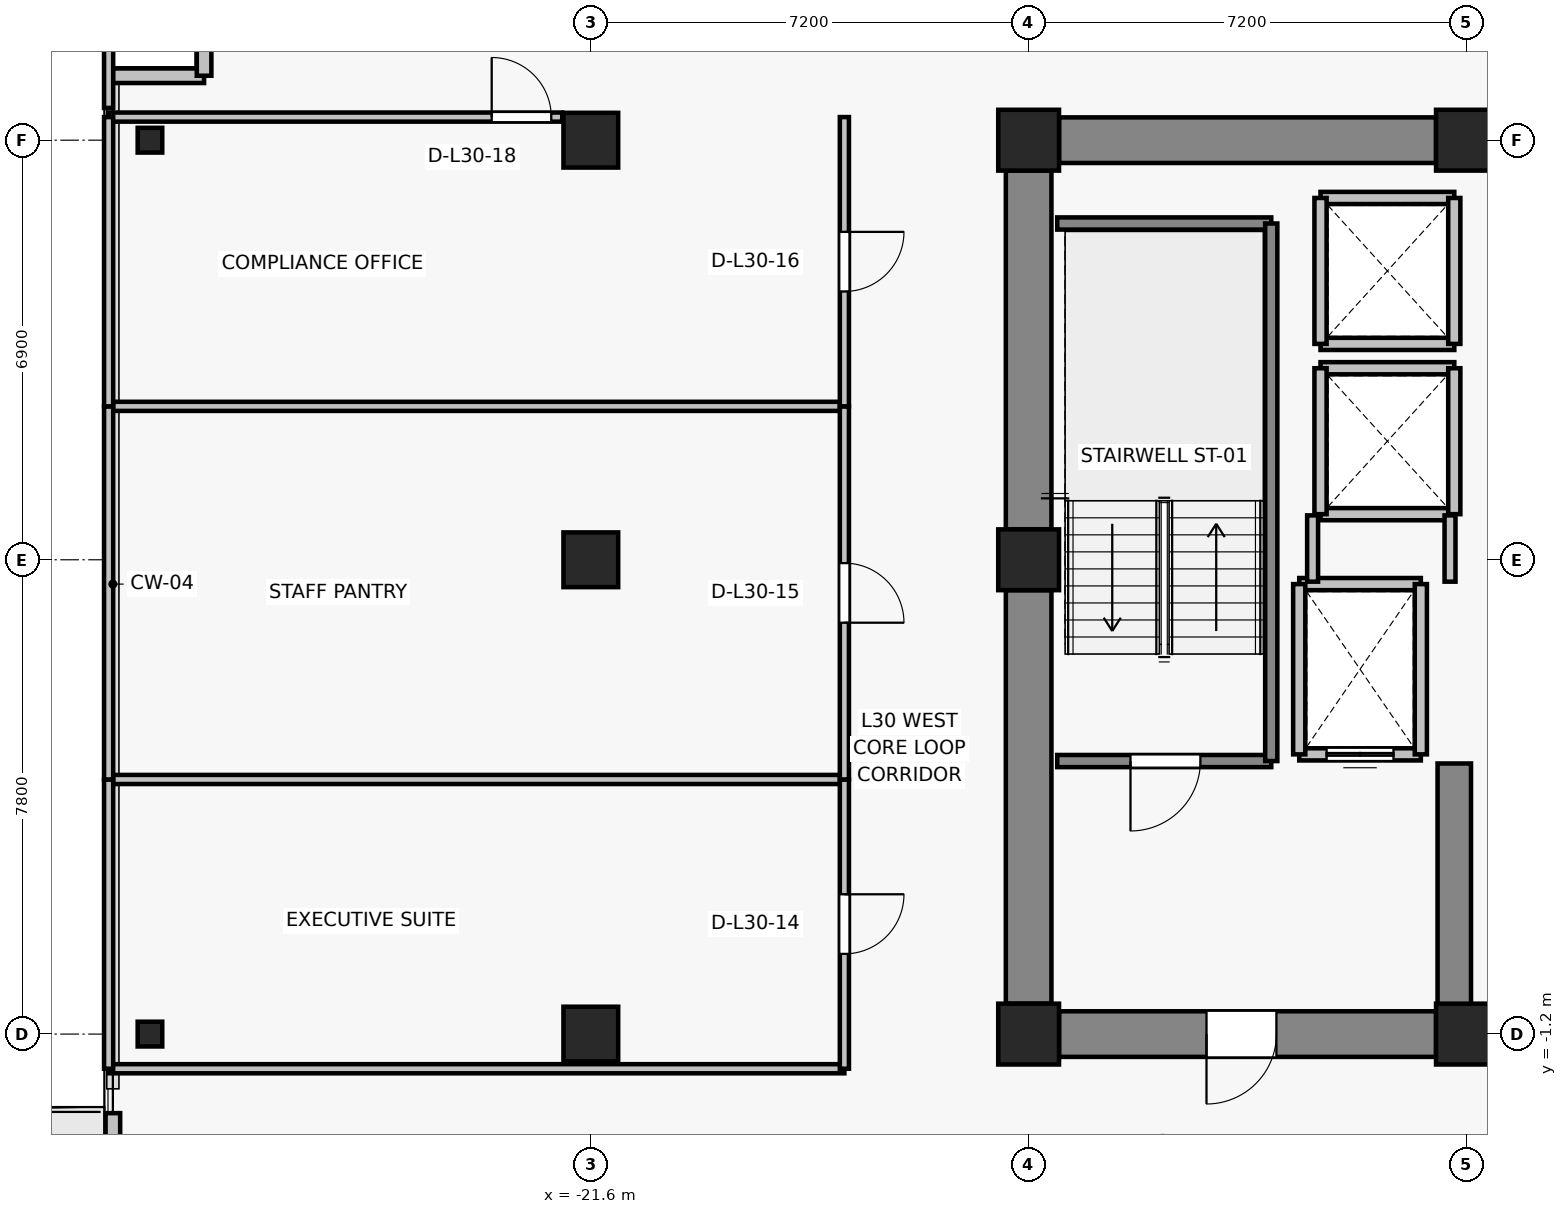
"""IFC4 building model, lengths in metres.
Left out: names, types, materials, properties, quantities, classifications, styles, units other than length and angle.
Written with IfcOpenShell. Run it as: python <this file> out.ifc"""

import sys

from ifc_helpers import new_model, si_unit, direction, frame, frame_2d, origin, origin_2d, place, context, subcontext, project, spatial, rectangle, i_section, extrude, source, transform, mapped, element, fill, save


model = new_model("IFC4")
c1 = context("Model", 3, precision=1e-05, world=origin(), true_north=direction((0.0, 1.0)))
c2 = subcontext(c1, "Body", "Model", "MODEL_VIEW")
j1 = project(units=[si_unit("LENGTHUNIT", "METRE"), si_unit("PLANEANGLEUNIT", "RADIAN")], contexts=[c1])
p1 = place(None, origin())
s1 = spatial("IfcSite", under=j1, at=p1, CompositionType="ELEMENT")
p2 = place(p1, origin())
s2 = spatial("IfcBuilding", under=s1, at=p2, CompositionType="ELEMENT")
p3 = place(p2, frame((0.0, 0.0, 109.9)))
s3 = spatial("IfcBuildingStorey", under=s2, at=p3, CompositionType="ELEMENT", Elevation=109.9)
for number, where, z_axis, x_axis in (
    (1, (-14.4, -1.2, 0.0), (0.0, 0.0, 1.0), (1.0, 0.0, 0.0)),
    (2, (-7.2, -1.2, 0.0), (0.0, 0.0, 1.0), (1.0, 0.0, 0.0)),
    (3, (-14.4, 6.6, 0.0), (0.0, 0.0, 1.0), (1.0, 0.0, 0.0)),
    (4, (-14.4, 13.5, 0.0), (0.0, 0.0, 1.0), (1.0, 0.0, 0.0)),
    (5, (-7.2, 13.5, 0.0), (0.0, 0.0, 1.0), (1.0, 0.0, 0.0)),
):
    element("IfcColumn", number, at=place(p3, frame(where, z_axis=z_axis, x_axis=x_axis)), inside=s3, PredefinedType="COLUMN", context=c2, shape_type="SweptSolid", body=[
        extrude(rectangle(XDim=1.0, YDim=1.0, at=origin_2d()), origin(), (0.0, 0.0, 1.0), 3.3),
    ])
for number, where, z_axis, x_axis in (
    (6, (-21.6, -1.2, 0.0), (0.0, 0.0, 1.0), (1.0, 0.0, 0.0)),
    (7, (-21.6, 6.6, 0.0), (0.0, 0.0, 1.0), (1.0, 0.0, 0.0)),
    (8, (-21.6, 13.5, 0.0), (0.0, 0.0, 1.0), (1.0, 0.0, 0.0)),
):
    element("IfcColumn", number, at=place(p3, frame(where, z_axis=z_axis, x_axis=x_axis)), inside=s3, PredefinedType="COLUMN", context=c2, shape_type="SweptSolid", body=[
        extrude(rectangle(XDim=0.9, YDim=0.9, at=origin_2d()), origin(), (0.0, 0.0, 1.0), 3.3),
    ])
for number, where, z_axis, x_axis in (
    (9, (-28.85, -1.2, 0.0), (0.0, 0.0, 1.0), (1.0, 0.0, 0.0)),
    (10, (-28.85, 13.5, 0.0), (0.0, 0.0, 1.0), (1.0, 0.0, 0.0)),
):
    element("IfcColumn", number, at=place(p3, frame(where, z_axis=z_axis, x_axis=x_axis)), inside=s3, PredefinedType="COLUMN", context=c2, shape_type="SweptSolid", body=[
        extrude(i_section(OverallWidth=0.404, OverallDepth=0.407, WebThickness=0.022, FlangeThickness=0.032, FilletRadius=0.015, at=origin_2d()), origin(), (0.0, 0.0, 1.0), 3.3),
    ])
p4 = place(p3, frame((-13.9, 13.5, 0.0), z_axis=(0.0, 0.0, 1.0), x_axis=(1.0, 0.0, 0.0)))
e11 = element("IfcWall", 11, at=p4, inside=s3, PredefinedType="SHEAR", context=c2, shape_type="SweptSolid", body=[
    extrude(rectangle(XDim=6.2, YDim=0.75, at=frame_2d((3.1, 0.0))), origin(), (0.0, 0.0, 1.0), 3.075),
])
p5 = place(p3, frame((-14.4, -0.7, 0.0), z_axis=(0.0, 0.0, 1.0), x_axis=(0.0, 1.0, 0.0)))
e12 = element("IfcWall", 12, at=p5, inside=s3, PredefinedType="SHEAR", context=c2, shape_type="SweptSolid", body=[
    extrude(rectangle(XDim=6.8, YDim=0.75, at=frame_2d((3.4, 0.0))), origin(), (0.0, 0.0, 1.0), 3.075),
])
p6 = place(p3, frame((-14.4, 7.1, 0.0), z_axis=(0.0, 0.0, 1.0), x_axis=(0.0, 1.0, 0.0)))
e13 = element("IfcWall", 13, at=p6, inside=s3, PredefinedType="SHEAR", context=c2, shape_type="SweptSolid", body=[
    extrude(rectangle(XDim=5.9, YDim=0.75, at=frame_2d((2.95, 0.0))), origin(), (0.0, 0.0, 1.0), 3.075),
])
p7 = place(p3, frame((-7.7, -1.2, 0.0), z_axis=(0.0, 0.0, 1.0), x_axis=(-1.0, 0.0, 0.0)))
e14 = element("IfcWall", 14, at=p7, inside=s3, PredefinedType="SHEAR", context=c2, shape_type="SweptSolid", body=[
    extrude(rectangle(XDim=6.2, YDim=0.75, at=frame_2d((3.1, 0.0))), origin(), (0.0, 0.0, 1.0), 3.075),
])
p8 = place(p7, frame((2.625, 0.0, 0.0)))
e15 = element("IfcOpeningElement", 15, at=p8, cuts=e14, PredefinedType="OPENING", context=c2, shape_type="SweptSolid", body=[
    extrude(rectangle(XDim=1.15, YDim=2.15, at=frame_2d((0.575, 1.075))), frame((0.0, 0.385, 0.0), z_axis=(0.0, -1.0, 0.0), x_axis=(1.0, 0.0, 0.0)), (0.0, 0.0, 1.0), 0.77),
])
p9 = place(p3, frame((-7.4, -0.825, 0.0), z_axis=(0.0, 0.0, 1.0), x_axis=(0.0, 1.0, 0.0)))
e16 = element("IfcWall", 16, at=p9, inside=s3, PredefinedType="SHEAR", context=c2, shape_type="SweptSolid", body=[
    extrude(rectangle(XDim=4.075, YDim=0.55, at=frame_2d((2.038, 0.0))), origin(), (0.0, 0.0, 1.0), 3.075),
])
p10 = place(p3, frame((-29.46, -8.3, 0.0), z_axis=(0.0, 0.0, 1.0), x_axis=(0.0, 1.0, 0.0)))
e17 = element("IfcWall", 17, at=p10, inside=s3, PredefinedType="SOLIDWALL", context=c2, shape_type="SweptSolid", body=[
    extrude(rectangle(XDim=5.8, YDim=0.24, at=frame_2d((2.9, 0.0))), origin(), (0.0, 0.0, 1.0), 3.075),
])
p11 = place(p10, frame((0.696, 0.0, 0.0)))
e18 = element("IfcOpeningElement", 18, at=p11, cuts=e17, PredefinedType="OPENING", context=c2, shape_type="SweptSolid", body=[
    extrude(rectangle(XDim=1.0, YDim=2.2, at=frame_2d((0.5, 1.1))), frame((0.0, 0.13, 0.0), z_axis=(0.0, -1.0, 0.0), x_axis=(1.0, 0.0, 0.0)), (0.0, 0.0, 1.0), 0.26),
])
p12 = place(p10, frame((2.046, 0.0, 0.85)))
e19 = element("IfcOpeningElement", 19, at=p12, cuts=e17, PredefinedType="OPENING", context=c2, shape_type="SweptSolid", body=[
    extrude(rectangle(XDim=1.5, YDim=1.6, at=frame_2d((0.75, 0.8))), frame((0.0, 0.13, 0.0), z_axis=(0.0, -1.0, 0.0), x_axis=(1.0, 0.0, 0.0)), (0.0, 0.0, 1.0), 0.26),
])
for number, where, z_axis, x_axis in (
    (20, (-27.96, 14.56, 0.0), (0.0, 0.0, 1.0), (-1.0, 0.0, 0.0)),
    (21, (-27.96, 16.06, 0.0), (0.0, 0.0, 1.0), (0.0, -1.0, 0.0)),
):
    element("IfcWall", number, at=place(p3, frame(where, z_axis=z_axis, x_axis=x_axis)), inside=s3, PredefinedType="SOLIDWALL", context=c2, shape_type="SweptSolid", body=[
        extrude(rectangle(XDim=1.5, YDim=0.24, at=frame_2d((0.75, 0.0))), origin(), (0.0, 0.0, 1.0), 3.075),
    ])
p13 = place(p3, frame((-7.95, 3.4, 0.0), z_axis=(0.0, 0.0, 1.0), x_axis=(-1.0, 0.0, 0.0)))
e22 = element("IfcWall", 22, at=p13, inside=s3, PredefinedType="SOLIDWALL", context=c2, shape_type="SweptSolid", body=[
    extrude(rectangle(XDim=2.0, YDim=0.2, at=frame_2d((1.0, 0.0))), origin(), (0.0, 0.0, 1.0), 3.075),
])
p14 = place(p13, frame((0.45, 0.0, 0.0)))
e23 = element("IfcOpeningElement", 23, at=p14, cuts=e22, PredefinedType="OPENING", context=c2, shape_type="SweptSolid", body=[
    extrude(rectangle(XDim=1.1, YDim=2.2, at=frame_2d((0.55, 1.1))), frame((0.0, 0.11, 0.0), z_axis=(0.0, -1.0, 0.0), x_axis=(1.0, 0.0, 0.0)), (0.0, 0.0, 1.0), 0.22),
])
p15 = place(p3, frame((-9.95, 6.2, 0.0), z_axis=(0.0, 0.0, 1.0), x_axis=(1.0, 0.0, 0.0)))
e24 = element("IfcWall", 24, at=p15, inside=s3, PredefinedType="SOLIDWALL", context=c2, shape_type="SweptSolid", body=[
    extrude(rectangle(XDim=2.0, YDim=0.2, at=frame_2d((1.0, 0.0))), origin(), (0.0, 0.0, 1.0), 3.075),
])
for number, where, z_axis, x_axis in (
    (25, (-9.95, 3.4, 0.0), (0.0, 0.0, 1.0), (0.0, 1.0, 0.0)),
    (26, (-7.95, 6.2, 0.0), (0.0, 0.0, 1.0), (0.0, -1.0, 0.0)),
):
    element("IfcWall", number, at=place(p3, frame(where, z_axis=z_axis, x_axis=x_axis)), inside=s3, PredefinedType="SOLIDWALL", context=c2, shape_type="SweptSolid", body=[
        extrude(rectangle(XDim=2.8, YDim=0.2, at=frame_2d((1.4, 0.0))), origin(), (0.0, 0.0, 1.0), 3.075),
    ])
for number, where, z_axis, x_axis in (
    (27, (-7.4, 7.35, 0.0), (0.0, 0.0, 1.0), (-1.0, 0.0, 0.0)),
    (28, (-9.6, 9.75, 0.0), (0.0, 0.0, 1.0), (1.0, 0.0, 0.0)),
):
    element("IfcWall", number, at=place(p3, frame(where, z_axis=z_axis, x_axis=x_axis)), inside=s3, PredefinedType="SOLIDWALL", context=c2, shape_type="SweptSolid", body=[
        extrude(rectangle(XDim=2.2, YDim=0.2, at=frame_2d((1.1, 0.0))), origin(), (0.0, 0.0, 1.0), 2.515),
    ])
p16 = place(p3, frame((-9.6, 7.35, 0.0), z_axis=(0.0, 0.0, 1.0), x_axis=(0.0, 1.0, 0.0)))
e29 = element("IfcWall", 29, at=p16, inside=s3, PredefinedType="SOLIDWALL", context=c2, shape_type="SweptSolid", body=[
    extrude(rectangle(XDim=2.4, YDim=0.2, at=frame_2d((1.2, 0.0))), origin(), (0.0, 0.0, 1.0), 3.075),
])
p17 = place(p3, frame((-7.4, 9.75, 0.0), z_axis=(0.0, 0.0, 1.0), x_axis=(0.0, -1.0, 0.0)))
e30 = element("IfcWall", 30, at=p17, inside=s3, PredefinedType="SOLIDWALL", context=c2, shape_type="SweptSolid", body=[
    extrude(rectangle(XDim=2.4, YDim=0.2, at=frame_2d((1.2, 0.0))), origin(), (0.0, 0.0, 1.0), 2.515),
])
for number, where, z_axis, x_axis in (
    (31, (-7.4, 10.15, 0.0), (0.0, 0.0, 1.0), (-1.0, 0.0, 0.0)),
    (32, (-9.6, 12.55, 0.0), (0.0, 0.0, 1.0), (1.0, 0.0, 0.0)),
):
    element("IfcWall", number, at=place(p3, frame(where, z_axis=z_axis, x_axis=x_axis)), inside=s3, PredefinedType="SOLIDWALL", context=c2, shape_type="SweptSolid", body=[
        extrude(rectangle(XDim=2.2, YDim=0.2, at=frame_2d((1.1, 0.0))), origin(), (0.0, 0.0, 1.0), 2.515),
    ])
p18 = place(p3, frame((-9.6, 10.15, 0.0), z_axis=(0.0, 0.0, 1.0), x_axis=(0.0, 1.0, 0.0)))
e33 = element("IfcWall", 33, at=p18, inside=s3, PredefinedType="SOLIDWALL", context=c2, shape_type="SweptSolid", body=[
    extrude(rectangle(XDim=2.4, YDim=0.2, at=frame_2d((1.2, 0.0))), origin(), (0.0, 0.0, 1.0), 3.075),
])
p19 = place(p3, frame((-7.4, 12.55, 0.0), z_axis=(0.0, 0.0, 1.0), x_axis=(0.0, -1.0, 0.0)))
e34 = element("IfcWall", 34, at=p19, inside=s3, PredefinedType="SOLIDWALL", context=c2, shape_type="SweptSolid", body=[
    extrude(rectangle(XDim=2.4, YDim=0.2, at=frame_2d((1.2, 0.0))), origin(), (0.0, 0.0, 1.0), 2.515),
])
p20 = place(p3, frame((-10.41, 3.29, 0.0), z_axis=(0.0, 0.0, 1.0), x_axis=(-1.0, 0.0, 0.0)))
e35 = element("IfcWall", 35, at=p20, inside=s3, PredefinedType="SOLIDWALL", context=c2, shape_type="SweptSolid", body=[
    extrude(rectangle(XDim=3.52, YDim=0.2, at=frame_2d((1.76, 0.0))), origin(), (0.0, 0.0, 1.0), 3.075),
])
p21 = place(p20, frame((1.165, 0.0, 0.0)))
e36 = element("IfcOpeningElement", 36, at=p21, cuts=e35, PredefinedType="OPENING", context=c2, shape_type="SweptSolid", body=[
    extrude(rectangle(XDim=1.15, YDim=2.15, at=frame_2d((0.575, 1.075))), frame((0.0, 0.11, 0.0), z_axis=(0.0, -1.0, 0.0), x_axis=(1.0, 0.0, 0.0)), (0.0, 0.0, 1.0), 0.22),
])
p22 = place(p3, frame((-13.93, 12.13, 0.0), z_axis=(0.0, 0.0, 1.0), x_axis=(1.0, 0.0, 0.0)))
e37 = element("IfcWall", 37, at=p22, inside=s3, PredefinedType="SOLIDWALL", context=c2, shape_type="SweptSolid", body=[
    extrude(rectangle(XDim=3.52, YDim=0.2, at=frame_2d((1.76, 0.0))), origin(), (0.0, 0.0, 1.0), 3.075),
])
p23 = place(p3, frame((-10.41, 12.13, 0.0), z_axis=(0.0, 0.0, 1.0), x_axis=(0.0, -1.0, 0.0)))
e38 = element("IfcWall", 38, at=p23, inside=s3, PredefinedType="SOLIDWALL", context=c2, shape_type="SweptSolid", body=[
    extrude(rectangle(XDim=8.84, YDim=0.2, at=frame_2d((4.42, 0.0))), origin(), (0.0, 0.0, 1.0), 3.075),
])
p24 = place(p3, frame((-9.73, 6.24, 0.0), z_axis=(0.0, 0.0, 1.0), x_axis=(0.0, 1.0, 0.0)))
e39 = element("IfcWall", 39, at=p24, inside=s3, PredefinedType="PARTITIONING", context=c2, shape_type="SweptSolid", body=[
    extrude(rectangle(XDim=1.09, YDim=0.18, at=frame_2d((0.545, 0.0))), origin(), (0.0, 0.0, 1.0), 3.075),
])
p25 = place(p3, frame((-7.47, 7.33, 0.0), z_axis=(0.0, 0.0, 1.0), x_axis=(0.0, -1.0, 0.0)))
e40 = element("IfcWall", 40, at=p25, inside=s3, PredefinedType="PARTITIONING", context=c2, shape_type="SweptSolid", body=[
    extrude(rectangle(XDim=1.09, YDim=0.18, at=frame_2d((0.545, 0.0))), origin(), (0.0, 0.0, 1.0), 2.515),
])
for number, where, z_axis, x_axis in (
    (41, (-17.43, -1.77, 0.0), (0.0, 0.0, 1.0), (-1.0, 0.0, 0.0)),
    (42, (-29.53, 2.987, 0.0), (0.0, 0.0, 1.0), (1.0, 0.0, 0.0)),
):
    element("IfcWall", number, at=place(p3, frame(where, z_axis=z_axis, x_axis=x_axis)), inside=s3, PredefinedType="PARTITIONING", context=c2, shape_type="SweptSolid", body=[
        extrude(rectangle(XDim=12.1, YDim=0.15, at=frame_2d((6.05, 0.0))), origin(), (0.0, 0.0, 1.0), 2.515),
    ])
p26 = place(p3, frame((-29.53, -1.77, 0.0), z_axis=(0.0, 0.0, 1.0), x_axis=(0.0, 1.0, 0.0)))
e43 = element("IfcWall", 43, at=p26, inside=s3, PredefinedType="PARTITIONING", context=c2, shape_type="SweptSolid", body=[
    extrude(rectangle(XDim=4.757, YDim=0.15, at=frame_2d((2.378, 0.0))), origin(), (0.0, 0.0, 1.0), 3.075),
])
p27 = place(p3, frame((-17.43, 2.987, 0.0), z_axis=(0.0, 0.0, 1.0), x_axis=(0.0, -1.0, 0.0)))
e44 = element("IfcWall", 44, at=p27, inside=s3, PredefinedType="PARTITIONING", context=c2, shape_type="SweptSolid", body=[
    extrude(rectangle(XDim=4.757, YDim=0.15, at=frame_2d((2.378, 0.0))), origin(), (0.0, 0.0, 1.0), 2.515),
])
p28 = place(p27, frame((1.888, 0.0, 0.0)))
e45 = element("IfcOpeningElement", 45, at=p28, cuts=e44, PredefinedType="OPENING", context=c2, shape_type="SweptSolid", body=[
    extrude(rectangle(XDim=0.98, YDim=2.15, at=frame_2d((0.49, 1.075))), frame((0.0, 0.085, 0.0), z_axis=(0.0, -1.0, 0.0), x_axis=(1.0, 0.0, 0.0)), (0.0, 0.0, 1.0), 0.17),
])
p29 = place(p3, frame((-29.53, 9.123, 0.0), z_axis=(0.0, 0.0, 1.0), x_axis=(1.0, 0.0, 0.0)))
e46 = element("IfcWall", 46, at=p29, inside=s3, PredefinedType="PARTITIONING", context=c2, shape_type="SweptSolid", body=[
    extrude(rectangle(XDim=12.1, YDim=0.15, at=frame_2d((6.05, 0.0))), origin(), (0.0, 0.0, 1.0), 2.515),
])
p30 = place(p3, frame((-29.53, 2.987, 0.0), z_axis=(0.0, 0.0, 1.0), x_axis=(0.0, 1.0, 0.0)))
e47 = element("IfcWall", 47, at=p30, inside=s3, PredefinedType="PARTITIONING", context=c2, shape_type="SweptSolid", body=[
    extrude(rectangle(XDim=6.136, YDim=0.15, at=frame_2d((3.068, 0.0))), origin(), (0.0, 0.0, 1.0), 3.075),
])
p31 = place(p3, frame((-17.43, 9.123, 0.0), z_axis=(0.0, 0.0, 1.0), x_axis=(0.0, -1.0, 0.0)))
e48 = element("IfcWall", 48, at=p31, inside=s3, PredefinedType="PARTITIONING", context=c2, shape_type="SweptSolid", body=[
    extrude(rectangle(XDim=6.136, YDim=0.15, at=frame_2d((3.068, 0.0))), origin(), (0.0, 0.0, 1.0), 2.515),
])
p32 = place(p31, frame((2.578, 0.0, 0.0)))
e49 = element("IfcOpeningElement", 49, at=p32, cuts=e48, PredefinedType="OPENING", context=c2, shape_type="SweptSolid", body=[
    extrude(rectangle(XDim=0.98, YDim=2.15, at=frame_2d((0.49, 1.075))), frame((0.0, 0.085, 0.0), z_axis=(0.0, -1.0, 0.0), x_axis=(1.0, 0.0, 0.0)), (0.0, 0.0, 1.0), 0.17),
])
p33 = place(p3, frame((-29.53, 13.88, 0.0), z_axis=(0.0, 0.0, 1.0), x_axis=(1.0, 0.0, 0.0)))
e50 = element("IfcWall", 50, at=p33, inside=s3, PredefinedType="PARTITIONING", context=c2, shape_type="SweptSolid", body=[
    extrude(rectangle(XDim=7.46, YDim=0.15, at=frame_2d((3.73, 0.0))), origin(), (0.0, 0.0, 1.0), 3.075),
])
p34 = place(p33, frame((6.3, 0.0, 0.0)))
e51 = element("IfcOpeningElement", 51, at=p34, cuts=e50, PredefinedType="OPENING", context=c2, shape_type="SweptSolid", body=[
    extrude(rectangle(XDim=0.98, YDim=2.15, at=frame_2d((0.49, 1.075))), frame((0.0, 0.085, 0.0), z_axis=(0.0, -1.0, 0.0), x_axis=(1.0, 0.0, 0.0)), (0.0, 0.0, 1.0), 0.17),
])
p35 = place(p3, frame((-29.53, 9.123, 0.0), z_axis=(0.0, 0.0, 1.0), x_axis=(0.0, 1.0, 0.0)))
e52 = element("IfcWall", 52, at=p35, inside=s3, PredefinedType="PARTITIONING", context=c2, shape_type="SweptSolid", body=[
    extrude(rectangle(XDim=4.757, YDim=0.15, at=frame_2d((2.378, 0.0))), origin(), (0.0, 0.0, 1.0), 3.075),
])
p36 = place(p3, frame((-17.43, 13.88, 0.0), z_axis=(0.0, 0.0, 1.0), x_axis=(0.0, -1.0, 0.0)))
e53 = element("IfcWall", 53, at=p36, inside=s3, PredefinedType="PARTITIONING", context=c2, shape_type="SweptSolid", body=[
    extrude(rectangle(XDim=4.757, YDim=0.15, at=frame_2d((2.378, 0.0))), origin(), (0.0, 0.0, 1.0), 2.515),
])
p37 = place(p36, frame((1.888, 0.0, 0.0)))
e54 = element("IfcOpeningElement", 54, at=p37, cuts=e53, PredefinedType="OPENING", context=c2, shape_type="SweptSolid", body=[
    extrude(rectangle(XDim=0.98, YDim=2.15, at=frame_2d((0.49, 1.075))), frame((0.0, 0.085, 0.0), z_axis=(0.0, -1.0, 0.0), x_axis=(1.0, 0.0, 0.0)), (0.0, 0.0, 1.0), 0.17),
])
p38 = place(p3, frame((-29.53, 14.03, 0.0), z_axis=(0.0, 0.0, 1.0), x_axis=(0.0, 1.0, 0.0)))
e55 = element("IfcWall", 55, at=p38, inside=s3, PredefinedType="PARTITIONING", context=c2, shape_type="SweptSolid", body=[
    extrude(rectangle(XDim=3.6, YDim=0.15, at=frame_2d((1.8, 0.0))), origin(), (0.0, 0.0, 1.0), 3.075),
])
m1 = source(origin(), c2, "Body", "SweptSolid", [
    extrude(rectangle(XDim=1.1, YDim=2.2, at=frame_2d((0.55, 1.1))), frame((0.0, 0.025, 0.0), z_axis=(0.0, -1.0, 0.0), x_axis=(1.0, 0.0, 0.0)), (0.0, 0.0, 1.0), 0.05),
])
p39 = place(p14, origin())
e56 = element("IfcDoor", 56, at=p39, inside=s3, OperationType="DOUBLE_DOOR_SLIDING", PredefinedType="DOOR", context=c2, shape_type="MappedRepresentation", body=[
    mapped(m1, transform((0.0, 0.0, 0.0), x_axis=(1.0, 0.0, 0.0), y_axis=(0.0, 1.0, 0.0), z_axis=(0.0, 0.0, 1.0), scale=1.0)),
])
fill(e23, e56)
m2 = source(origin(), c2, "Body", "SweptSolid", [
    extrude(rectangle(XDim=1.15, YDim=2.15, at=frame_2d((0.575, 1.075))), frame((0.0, 0.025, 0.0), z_axis=(0.0, -1.0, 0.0), x_axis=(1.0, 0.0, 0.0)), (0.0, 0.0, 1.0), 0.05),
])
p40 = place(p21, origin())
e57 = element("IfcDoor", 57, at=p40, inside=s3, OperationType="SINGLE_SWING_RIGHT", PredefinedType="DOOR", context=c2, shape_type="MappedRepresentation", body=[
    mapped(m2, transform((0.0, 0.0, 0.0), x_axis=(1.0, 0.0, 0.0), y_axis=(0.0, 1.0, 0.0), z_axis=(0.0, 0.0, 1.0), scale=1.0)),
])
fill(e36, e57)
p41 = place(p8, origin())
e58 = element("IfcDoor", 58, at=p41, inside=s3, OperationType="SINGLE_SWING_RIGHT", PredefinedType="DOOR", context=c2, shape_type="MappedRepresentation", body=[
    mapped(m2, transform((0.0, 0.0, 0.0), x_axis=(1.0, 0.0, 0.0), y_axis=(0.0, 1.0, 0.0), z_axis=(0.0, 0.0, 1.0), scale=1.0)),
])
fill(e15, e58)
m3 = source(origin(), c2, "Body", "SweptSolid", [
    extrude(rectangle(XDim=0.98, YDim=2.15, at=frame_2d((0.49, 1.075))), frame((0.0, 0.025, 0.0), z_axis=(0.0, -1.0, 0.0), x_axis=(1.0, 0.0, 0.0)), (0.0, 0.0, 1.0), 0.05),
])
p42 = place(p28, origin())
e59 = element("IfcDoor", 59, at=p42, inside=s3, OperationType="SINGLE_SWING_LEFT", PredefinedType="DOOR", context=c2, shape_type="MappedRepresentation", body=[
    mapped(m3, transform((0.0, 0.0, 0.0), x_axis=(1.0, 0.0, 0.0), y_axis=(0.0, 1.0, 0.0), z_axis=(0.0, 0.0, 1.0), scale=1.0)),
])
fill(e45, e59)
p43 = place(p32, origin())
e60 = element("IfcDoor", 60, at=p43, inside=s3, OperationType="SINGLE_SWING_RIGHT", PredefinedType="DOOR", context=c2, shape_type="MappedRepresentation", body=[
    mapped(m3, transform((0.0, 0.0, 0.0), x_axis=(1.0, 0.0, 0.0), y_axis=(0.0, 1.0, 0.0), z_axis=(0.0, 0.0, 1.0), scale=1.0)),
])
fill(e49, e60)
p44 = place(p37, origin())
e61 = element("IfcDoor", 61, at=p44, inside=s3, OperationType="SINGLE_SWING_LEFT", PredefinedType="DOOR", context=c2, shape_type="MappedRepresentation", body=[
    mapped(m3, transform((0.0, 0.0, 0.0), x_axis=(1.0, 0.0, 0.0), y_axis=(0.0, 1.0, 0.0), z_axis=(0.0, 0.0, 1.0), scale=1.0)),
])
fill(e54, e61)
p45 = place(p34, origin())
e62 = element("IfcDoor", 62, at=p45, inside=s3, OperationType="SINGLE_SWING_LEFT", PredefinedType="DOOR", context=c2, shape_type="MappedRepresentation", body=[
    mapped(m3, transform((0.0, 0.0, 0.0), x_axis=(1.0, 0.0, 0.0), y_axis=(0.0, 1.0, 0.0), z_axis=(0.0, 0.0, 1.0), scale=1.0)),
])
fill(e51, e62)
save(model, sys.argv[1])
